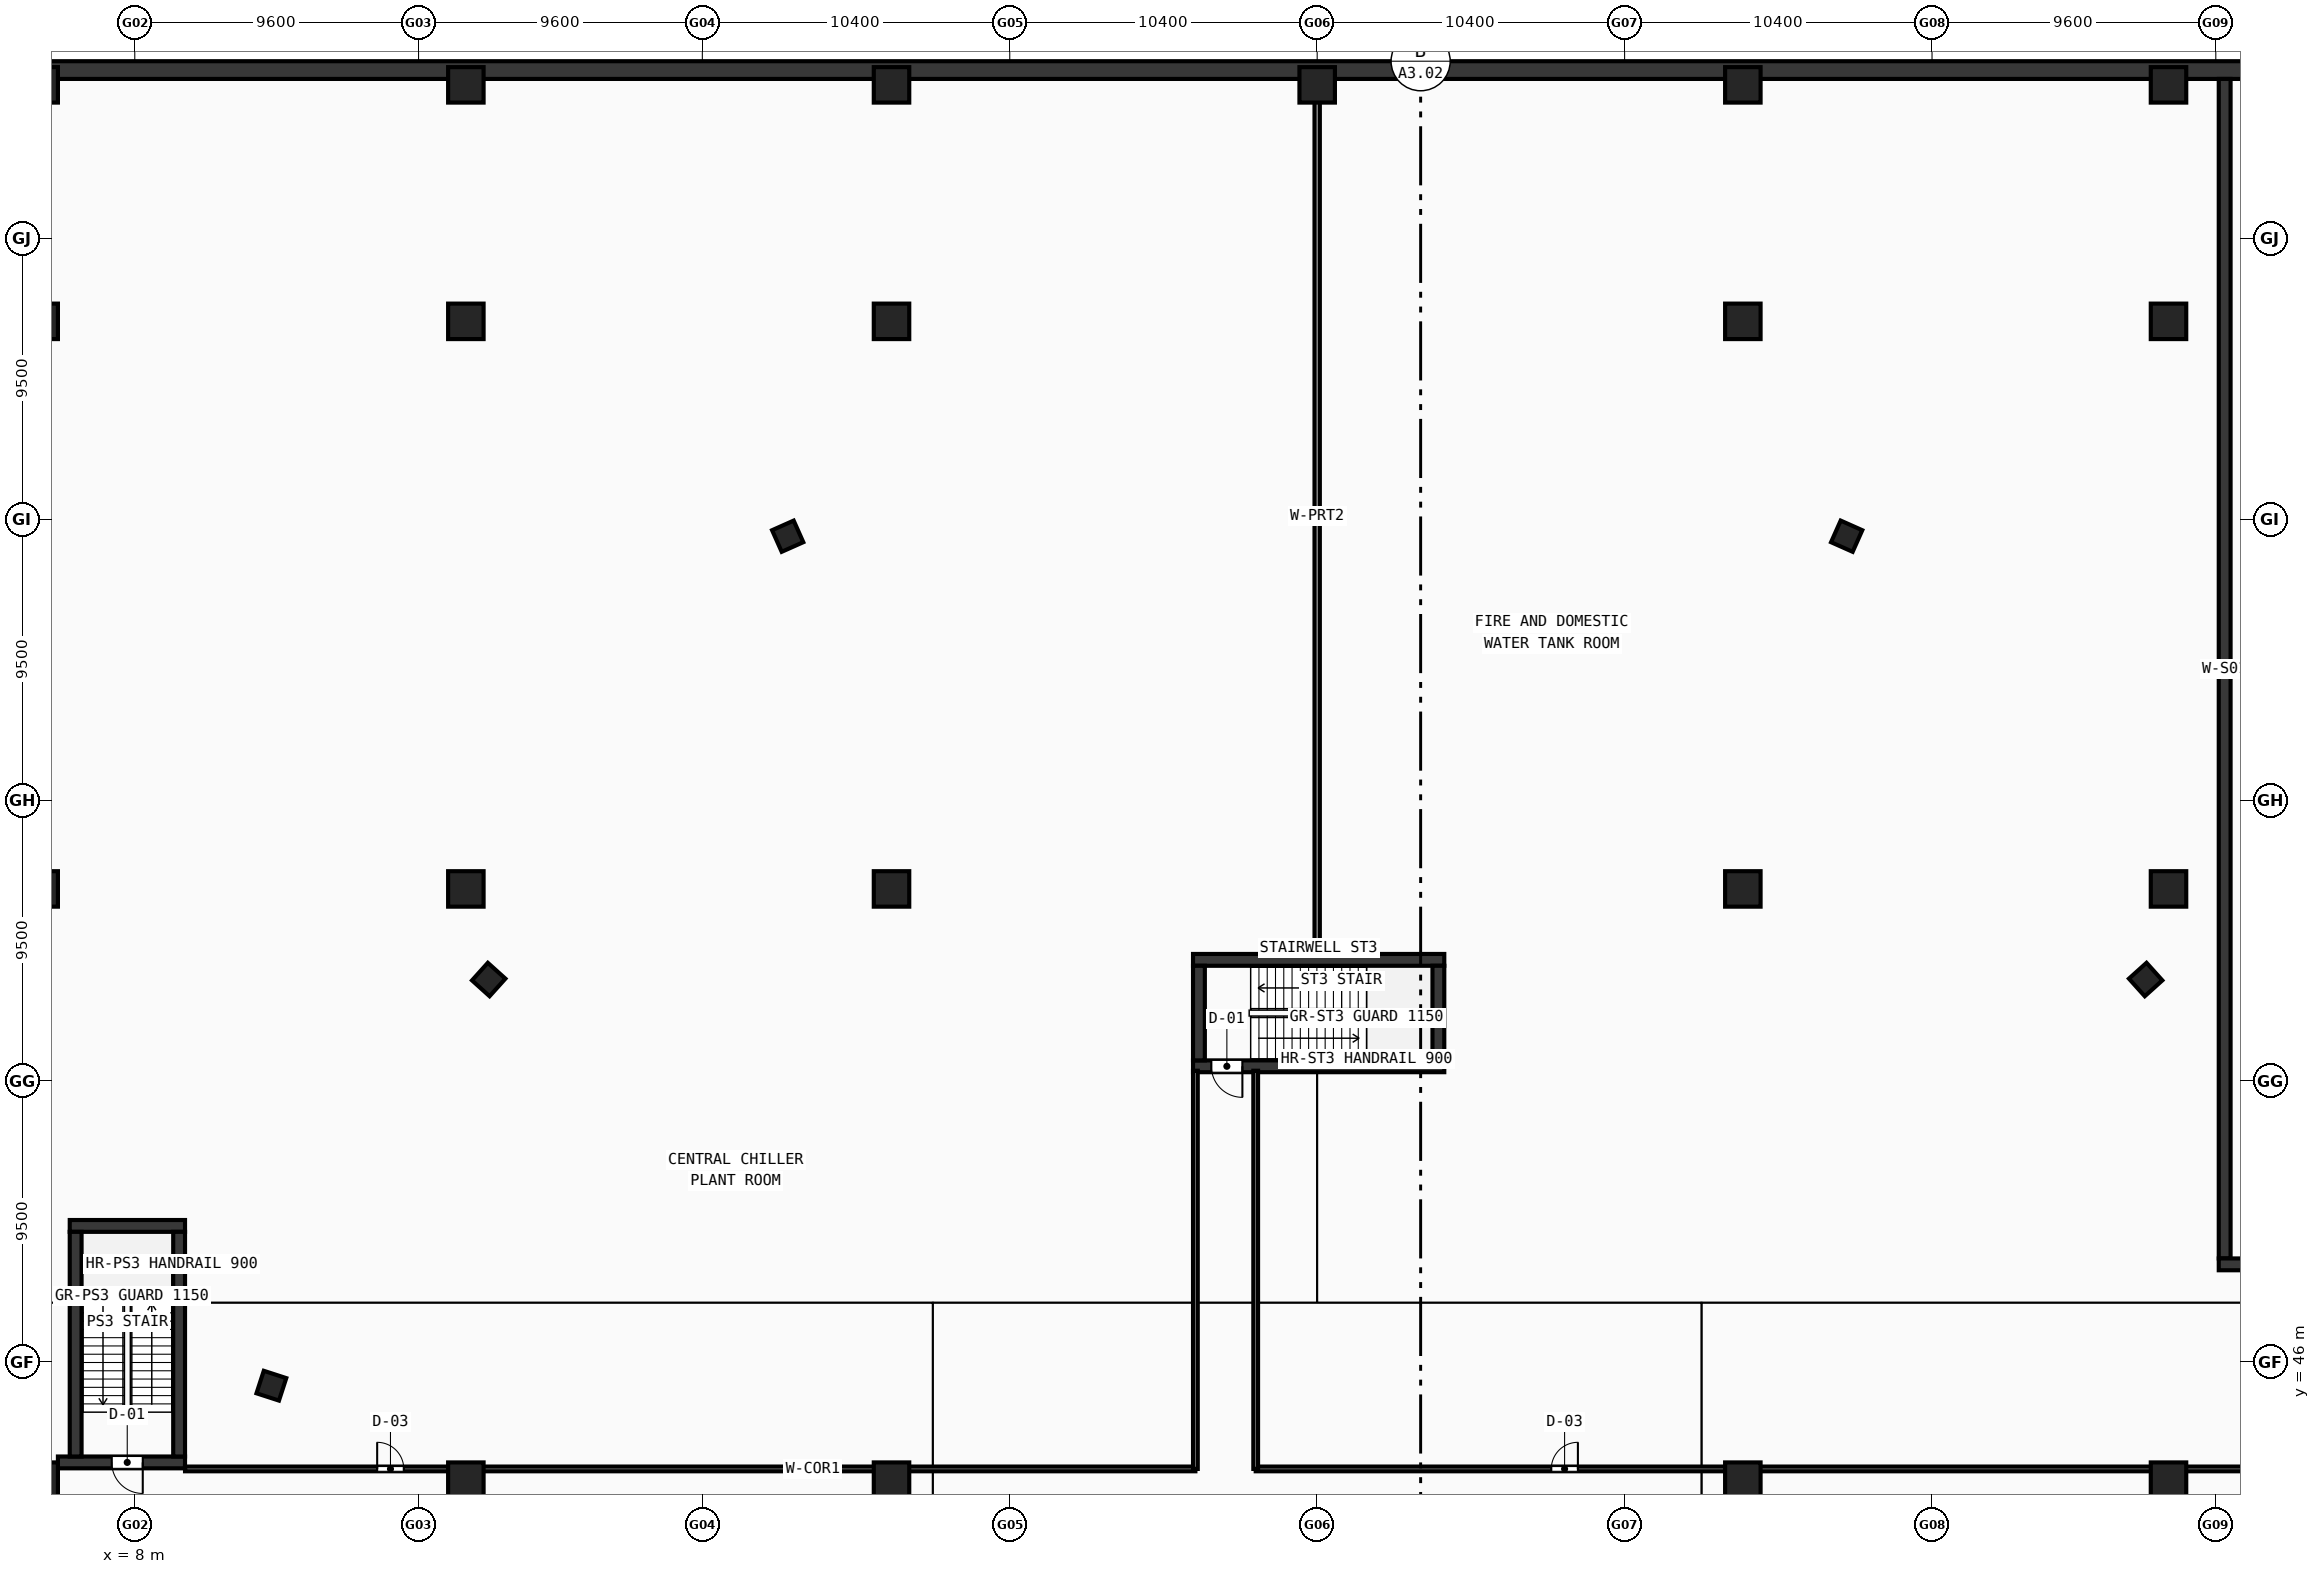
"""IFC4 building model, lengths in metres.
Left out: names, types, materials, properties, quantities, classifications, styles, units other than length and angle.
Written with IfcOpenShell. Run it as: python <this file> out.ifc"""

import sys

from ifc_helpers import new_model, si_unit, direction, frame, frame_2d, origin, origin_with_axes, origin_2d, place, context, subcontext, project, spatial, rectangle, hollow_rectangle, extrude, source, transform, mapped, element, fill, save


model = new_model("IFC4")
c1 = context("Model", 3, precision=1e-05, world=origin(), true_north=direction((0.0, 1.0)))
c2 = subcontext(c1, "Body", "Model", "MODEL_VIEW")
j1 = project(units=[si_unit("LENGTHUNIT", "METRE"), si_unit("PLANEANGLEUNIT", "RADIAN")], contexts=[c1])
p1 = place(None, origin())
s1 = spatial("IfcSite", under=j1, at=p1, CompositionType="ELEMENT")
p2 = place(p1, origin())
s2 = spatial("IfcBuilding", under=s1, at=p2, CompositionType="ELEMENT")
p3 = place(p2, frame((0.0, 0.0, -10.0)))
s3 = spatial("IfcBuildingStorey", under=s2, at=p3, CompositionType="ELEMENT", Elevation=-10.0)
p4 = place(p3, frame((4.0, 89.7, -0.6), z_axis=(0.0, 0.0, 1.0), x_axis=(1.0, 0.0, 0.0)))
e1 = element("IfcWall", 1, at=p4, inside=s3, PredefinedType="SHEAR", context=c2, shape_type="SweptSolid", body=[
    extrude(rectangle(XDim=88.0, YDim=0.6, at=frame_2d((44.0, 0.0))), origin(), (0.0, 0.0, 1.0), 5.5),
])
p5 = place(p3, frame((78.7, 49.5, -0.6), z_axis=(0.0, 0.0, 1.0), x_axis=(0.0, 1.0, 0.0)))
e2 = element("IfcWall", 2, at=p5, inside=s3, PredefinedType="SHEAR", context=c2, shape_type="SweptSolid", body=[
    extrude(rectangle(XDim=39.9, YDim=0.4, at=frame_2d((19.95, 0.0))), origin(), (0.0, 0.0, 1.0), 5.5),
])
p6 = place(p3, frame((78.5, 49.3, -0.6), z_axis=(0.0, 0.0, 1.0), x_axis=(1.0, 0.0, 0.0)))
e3 = element("IfcWall", 3, at=p6, inside=s3, PredefinedType="SHEAR", context=c2, shape_type="SweptSolid", body=[
    extrude(rectangle(XDim=6.5, YDim=0.4, at=frame_2d((3.25, 0.0))), origin(), (0.0, 0.0, 1.0), 5.5),
])
p7 = place(p3, frame((5.8, 50.6, -0.6), z_axis=(0.0, 0.0, 1.0), x_axis=(1.0, 0.0, 0.0)))
e4 = element("IfcWall", 4, at=p7, inside=s3, PredefinedType="SHEAR", context=c2, shape_type="SweptSolid", body=[
    extrude(rectangle(XDim=3.9, YDim=0.4, at=frame_2d((1.95, 0.0))), origin(), (0.0, 0.0, 1.0), 5.5),
])
p8 = place(p3, frame((5.4, 42.6, -0.6), z_axis=(0.0, 0.0, 1.0), x_axis=(1.0, 0.0, 0.0)))
e5 = element("IfcWall", 5, at=p8, inside=s3, PredefinedType="SHEAR", context=c2, shape_type="SweptSolid", body=[
    extrude(rectangle(XDim=4.3, YDim=0.4, at=frame_2d((2.15, 0.0))), origin(), (0.0, 0.0, 1.0), 5.5),
])
p9 = place(p8, frame((1.82, 0.0, 0.6)))
e6 = element("IfcOpeningElement", 6, at=p9, cuts=e5, PredefinedType="OPENING", context=c2, shape_type="SweptSolid", body=[
    extrude(rectangle(XDim=1.05, YDim=2.1, at=frame_2d((0.525, 1.05))), frame((0.0, 0.21, 0.0), z_axis=(0.0, -1.0, 0.0), x_axis=(1.0, 0.0, 0.0)), (0.0, 0.0, 1.0), 0.42),
])
for number, where, z_axis, x_axis in (
    (7, (6.0, 42.8, -0.6), (0.0, 0.0, 1.0), (0.0, 1.0, 0.0)),
    (8, (9.5, 42.8, -0.6), (0.0, 0.0, 1.0), (0.0, 1.0, 0.0)),
):
    element("IfcWall", number, at=place(p3, frame(where, z_axis=z_axis, x_axis=x_axis)), inside=s3, PredefinedType="SHEAR", context=c2, shape_type="SweptSolid", body=[
        extrude(rectangle(XDim=7.6, YDim=0.4, at=frame_2d((3.8, 0.0))), origin(), (0.0, 0.0, 1.0), 5.5),
    ])
p10 = place(p3, frame((43.8, 59.6, -0.6), z_axis=(0.0, 0.0, 1.0), x_axis=(1.0, 0.0, 0.0)))
e9 = element("IfcWall", 9, at=p10, inside=s3, PredefinedType="SHEAR", context=c2, shape_type="SweptSolid", body=[
    extrude(rectangle(XDim=8.5, YDim=0.4, at=frame_2d((4.25, 0.0))), origin(), (0.0, 0.0, 1.0), 5.5),
])
p11 = place(p3, frame((43.8, 56.0, -0.6), z_axis=(0.0, 0.0, 1.0), x_axis=(1.0, 0.0, 0.0)))
e10 = element("IfcWall", 10, at=p11, inside=s3, PredefinedType="SHEAR", context=c2, shape_type="SweptSolid", body=[
    extrude(rectangle(XDim=8.5, YDim=0.4, at=frame_2d((4.25, 0.0))), origin(), (0.0, 0.0, 1.0), 5.5),
])
p12 = place(p11, frame((0.62, 0.0, 0.6)))
e11 = element("IfcOpeningElement", 11, at=p12, cuts=e10, PredefinedType="OPENING", context=c2, shape_type="SweptSolid", body=[
    extrude(rectangle(XDim=1.05, YDim=2.1, at=frame_2d((0.525, 1.05))), frame((0.0, 0.21, 0.0), z_axis=(0.0, -1.0, 0.0), x_axis=(1.0, 0.0, 0.0)), (0.0, 0.0, 1.0), 0.42),
])
for number, where, z_axis, x_axis in (
    (12, (44.0, 56.2, -0.6), (0.0, 0.0, 1.0), (0.0, 1.0, 0.0)),
    (13, (52.1, 56.2, -0.6), (0.0, 0.0, 1.0), (0.0, 1.0, 0.0)),
):
    element("IfcWall", number, at=place(p3, frame(where, z_axis=z_axis, x_axis=x_axis)), inside=s3, PredefinedType="SHEAR", context=c2, shape_type="SweptSolid", body=[
        extrude(rectangle(XDim=3.2, YDim=0.4, at=frame_2d((1.6, 0.0))), origin(), (0.0, 0.0, 1.0), 5.5),
    ])
m1 = source(origin(), c2, "Body", "SweptSolid", [
    extrude(hollow_rectangle(XDim=1.2, YDim=1.2, WallThickness=0.05, at=origin_2d()), origin(), (0.0, 0.0, 1.0), 5.5),
])
for number, where, z_axis, x_axis in (
    (14, (4.8, 42.0, -0.6), (0.0, 0.0, 1.0), (1.0, 0.0, 0.0)),
    (15, (4.8, 62.0, -0.6), (0.0, 0.0, 1.0), (1.0, 0.0, 0.0)),
    (16, (4.8, 81.2, -0.6), (0.0, 0.0, 1.0), (1.0, 0.0, 0.0)),
    (17, (19.2, 42.0, -0.6), (0.0, 0.0, 1.0), (1.0, 0.0, 0.0)),
    (18, (19.2, 62.0, -0.6), (0.0, 0.0, 1.0), (1.0, 0.0, 0.0)),
    (19, (19.2, 81.2, -0.6), (0.0, 0.0, 1.0), (1.0, 0.0, 0.0)),
    (20, (33.6, 42.0, -0.6), (0.0, 0.0, 1.0), (1.0, 0.0, 0.0)),
    (21, (33.6, 62.0, -0.6), (0.0, 0.0, 1.0), (1.0, 0.0, 0.0)),
    (22, (33.6, 81.2, -0.6), (0.0, 0.0, 1.0), (1.0, 0.0, 0.0)),
    (23, (62.4, 42.0, -0.6), (0.0, 0.0, 1.0), (1.0, 0.0, 0.0)),
    (24, (62.4, 62.0, -0.6), (0.0, 0.0, 1.0), (1.0, 0.0, 0.0)),
    (25, (62.4, 81.2, -0.6), (0.0, 0.0, 1.0), (1.0, 0.0, 0.0)),
    (26, (76.8, 42.0, -0.6), (0.0, 0.0, 1.0), (1.0, 0.0, 0.0)),
    (27, (76.8, 62.0, -0.6), (0.0, 0.0, 1.0), (1.0, 0.0, 0.0)),
    (28, (76.8, 81.2, -0.6), (0.0, 0.0, 1.0), (1.0, 0.0, 0.0)),
):
    element("IfcColumn", number, at=place(p3, frame(where, z_axis=z_axis, x_axis=x_axis)), inside=s3, PredefinedType="COLUMN", context=c2, shape_type="MappedRepresentation", body=[
        mapped(m1, transform((0.0, 0.0, 0.0), scale=1.0)),
    ])
m2 = source(origin(), c2, "Body", "SweptSolid", [
    extrude(hollow_rectangle(XDim=0.8, YDim=0.8, WallThickness=0.032, at=origin_2d()), origin(), (0.0, 0.0, 1.0), 5.5),
])
for number, where, z_axis, x_axis in (
    (29, (76.027, 58.935, -0.6), (0.0, 0.0, 1.0), (-0.669, 0.743, 0.0)),
    (30, (65.913, 73.932, -0.6), (0.0, 0.0, 1.0), (-0.914, 0.407, 0.0)),
    (31, (30.088, 73.932, -0.6), (0.0, 0.0, 1.0), (-0.914, -0.407, 0.0)),
    (32, (19.973, 58.935, -0.6), (0.0, 0.0, 1.0), (-0.669, -0.743, 0.0)),
    (33, (12.621, 45.196, -0.6), (0.0, 0.0, 1.0), (-0.309, -0.951, 0.0)),
):
    element("IfcColumn", number, at=place(p3, frame(where, z_axis=z_axis, x_axis=x_axis)), inside=s3, PredefinedType="COLUMN", context=c2, shape_type="MappedRepresentation", body=[
        mapped(m2, transform((0.0, 0.0, 0.0), scale=1.0)),
    ])
for number, where, z_axis, x_axis in (
    (34, (4.8, 89.2, -0.6), (0.0, 0.0, 1.0), (1.0, 0.0, 0.0)),
    (35, (19.2, 89.2, -0.6), (0.0, 0.0, 1.0), (1.0, 0.0, 0.0)),
    (36, (33.6, 89.2, -0.6), (0.0, 0.0, 1.0), (1.0, 0.0, 0.0)),
    (37, (48.0, 89.2, -0.6), (0.0, 0.0, 1.0), (1.0, 0.0, 0.0)),
    (38, (62.4, 89.2, -0.6), (0.0, 0.0, 1.0), (1.0, 0.0, 0.0)),
    (39, (76.8, 89.2, -0.6), (0.0, 0.0, 1.0), (1.0, 0.0, 0.0)),
):
    element("IfcColumn", number, at=place(p3, frame(where, z_axis=z_axis, x_axis=x_axis)), inside=s3, PredefinedType="COLUMN", context=c2, shape_type="MappedRepresentation", body=[
        mapped(m1, transform((0.0, 0.0, 0.0), scale=1.0)),
    ])
p13 = place(p3, frame((9.7, 42.38, 0.0), z_axis=(0.0, 0.0, 1.0), x_axis=(1.0, 0.0, 0.0)))
e40 = element("IfcWall", 40, at=p13, inside=s3, PredefinedType="PARTITIONING", context=c2, shape_type="SweptSolid", body=[
    extrude(rectangle(XDim=34.18, YDim=0.16, at=frame_2d((17.09, 0.0))), origin(), (0.0, 0.0, 1.0), 4.0),
])
p14 = place(p13, frame((6.5, 0.0, 0.0)))
e41 = element("IfcOpeningElement", 41, at=p14, cuts=e40, PredefinedType="OPENING", context=c2, shape_type="SweptSolid", body=[
    extrude(rectangle(XDim=0.9, YDim=2.1, at=frame_2d((0.45, 1.05))), frame((0.0, 0.09, 0.0), z_axis=(0.0, -1.0, 0.0), x_axis=(1.0, 0.0, 0.0)), (0.0, 0.0, 1.0), 0.18),
])
p15 = place(p3, frame((45.92, 42.38, 0.0), z_axis=(0.0, 0.0, 1.0), x_axis=(1.0, 0.0, 0.0)))
e42 = element("IfcWall", 42, at=p15, inside=s3, PredefinedType="PARTITIONING", context=c2, shape_type="SweptSolid", body=[
    extrude(rectangle(XDim=40.38, YDim=0.16, at=frame_2d((20.19, 0.0))), origin(), (0.0, 0.0, 1.0), 4.0),
])
p16 = place(p15, frame((10.0, 0.0, 0.0)))
e43 = element("IfcOpeningElement", 43, at=p16, cuts=e42, PredefinedType="OPENING", context=c2, shape_type="SweptSolid", body=[
    extrude(rectangle(XDim=0.9, YDim=2.1, at=frame_2d((0.45, 1.05))), frame((0.0, 0.09, 0.0), z_axis=(0.0, -1.0, 0.0), x_axis=(1.0, 0.0, 0.0)), (0.0, 0.0, 1.0), 0.18),
])
for number, where, z_axis, x_axis in (
    (44, (43.88, 42.38, 0.0), (0.0, 0.0, 1.0), (0.0, 1.0, 0.0)),
    (45, (45.92, 42.38, 0.0), (0.0, 0.0, 1.0), (0.0, 1.0, 0.0)),
):
    element("IfcWall", number, at=place(p3, frame(where, z_axis=z_axis, x_axis=x_axis)), inside=s3, PredefinedType="PARTITIONING", context=c2, shape_type="SweptSolid", body=[
        extrude(rectangle(XDim=13.47, YDim=0.16, at=frame_2d((6.735, 0.0))), origin(), (0.0, 0.0, 1.0), 4.5),
    ])
p17 = place(p3, frame((48.0, 59.8, 0.0), z_axis=(0.0, 0.0, 1.0), x_axis=(0.0, 1.0, 0.0)))
e46 = element("IfcWall", 46, at=p17, inside=s3, PredefinedType="PARTITIONING", context=c2, shape_type="SweptSolid", body=[
    extrude(rectangle(XDim=29.6, YDim=0.18, at=frame_2d((14.8, 0.0))), origin(), (0.0, 0.0, 1.0), 4.0),
])
m3 = source(origin(), c2, "Body", "SweptSolid", [
    extrude(rectangle(XDim=1.05, YDim=2.1, at=frame_2d((0.525, 1.05))), frame((0.0, 0.025, 0.0), z_axis=(0.0, -1.0, 0.0), x_axis=(1.0, 0.0, 0.0)), (0.0, 0.0, 1.0), 0.05),
])
p18 = place(p9, frame((1.05, 0.0, 0.0), z_axis=(0.0, 0.0, 1.0), x_axis=(-1.0, 0.0, 0.0)))
e47 = element("IfcDoor", 47, at=p18, inside=s3, OperationType="SINGLE_SWING_LEFT", PredefinedType="DOOR", context=c2, shape_type="MappedRepresentation", body=[
    mapped(m3, transform((0.0, 0.0, 0.0), scale=1.0)),
])
fill(e6, e47)
p19 = place(p12, frame((1.05, 0.0, 0.0), z_axis=(0.0, 0.0, 1.0), x_axis=(-1.0, 0.0, 0.0)))
e48 = element("IfcDoor", 48, at=p19, inside=s3, OperationType="SINGLE_SWING_LEFT", PredefinedType="DOOR", context=c2, shape_type="MappedRepresentation", body=[
    mapped(m3, transform((0.0, 0.0, 0.0), scale=1.0)),
])
fill(e11, e48)
m4 = source(origin(), c2, "Body", "SweptSolid", [
    extrude(rectangle(XDim=0.9, YDim=2.1, at=frame_2d((0.45, 1.05))), frame((0.0, 0.025, 0.0), z_axis=(0.0, -1.0, 0.0), x_axis=(1.0, 0.0, 0.0)), (0.0, 0.0, 1.0), 0.05),
])
p20 = place(p14, origin_with_axes())
e49 = element("IfcDoor", 49, at=p20, inside=s3, OperationType="SINGLE_SWING_LEFT", PredefinedType="DOOR", context=c2, shape_type="MappedRepresentation", body=[
    mapped(m4, transform((0.0, 0.0, 0.0), scale=1.0)),
])
fill(e41, e49)
p21 = place(p16, origin_with_axes())
e50 = element("IfcDoor", 50, at=p21, inside=s3, OperationType="SINGLE_SWING_RIGHT", PredefinedType="DOOR", context=c2, shape_type="MappedRepresentation", body=[
    mapped(m4, transform((0.0, 0.0, 0.0), scale=1.0)),
])
fill(e43, e50)
save(model, sys.argv[1])
